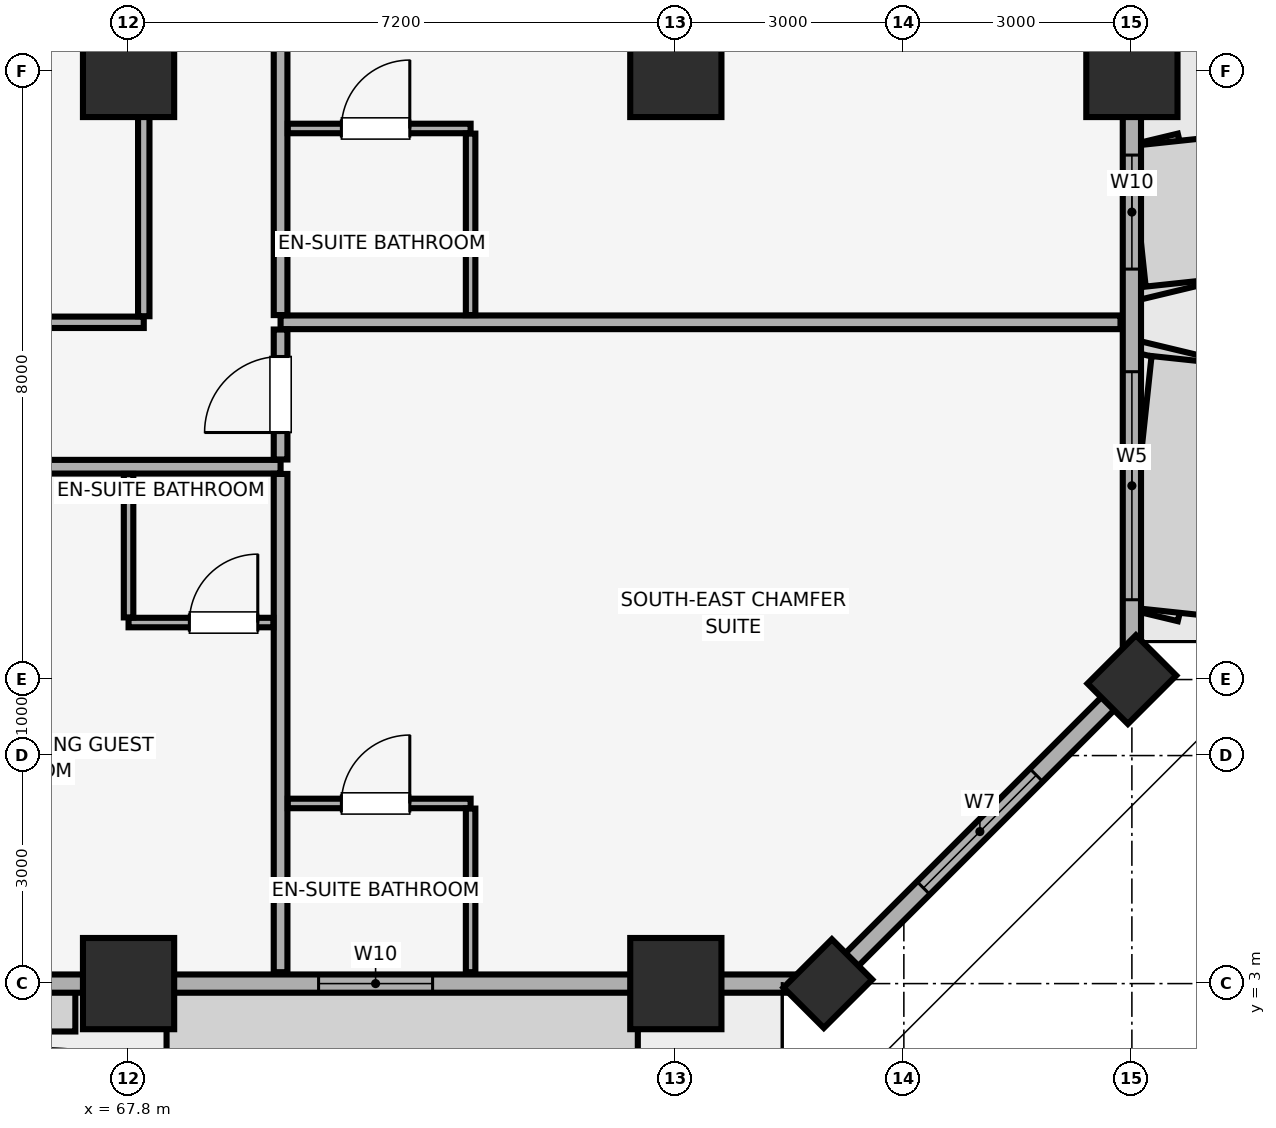
"""IFC4 building model, lengths in metres.
Left out: names, types, materials, properties, quantities, classifications, styles, units other than length and angle.
Written with IfcOpenShell. Run it as: python <this file> out.ifc"""

import sys

from ifc_helpers import new_model, si_unit, direction, frame, frame_2d, origin, origin_2d, place, context, subcontext, project, spatial, rectangle, extrude, element, fill, save


model = new_model("IFC4")
c1 = context("Model", 3, precision=1e-05, world=origin(), true_north=direction((0.0, 1.0)))
c2 = subcontext(c1, "Body", "Model", "MODEL_VIEW")
j1 = project(units=[si_unit("LENGTHUNIT", "METRE"), si_unit("PLANEANGLEUNIT", "RADIAN")], contexts=[c1])
p1 = place(None, origin())
s1 = spatial("IfcSite", under=j1, at=p1, CompositionType="ELEMENT")
p2 = place(p1, origin())
s2 = spatial("IfcBuilding", under=s1, at=p2, CompositionType="ELEMENT")
p3 = place(p2, frame((0.0, 0.0, 135.35)))
s3 = spatial("IfcBuildingStorey", under=s2, at=p3, CompositionType="ELEMENT", Elevation=135.35)
for number, where, z_axis, x_axis in (
    (1, (67.8, 3.0, 0.0), (0.0, 0.0, 1.0), (1.0, 0.0, 0.0)),
    (2, (75.0, 3.0, 0.0), (0.0, 0.0, 1.0), (1.0, 0.0, 0.0)),
    (3, (81.0, 15.0, 0.0), (0.0, 0.0, 1.0), (1.0, 0.0, 0.0)),
):
    element("IfcColumn", number, at=place(p3, frame(where, z_axis=z_axis, x_axis=x_axis)), inside=s3, PredefinedType="COLUMN", context=c2, shape_type="SweptSolid", body=[
        extrude(rectangle(XDim=1.2, YDim=1.2, at=origin_2d()), origin(), (0.0, 0.0, 1.0), 3.56),
    ])
for number, where, z_axis, x_axis in (
    (4, (77.0, 3.0, 0.0), (0.0, 0.0, 1.0), (0.707, 0.707, 0.0)),
    (5, (81.0, 7.0, 0.0), (0.0, 0.0, 1.0), (0.707, 0.707, 0.0)),
):
    element("IfcColumn", number, at=place(p3, frame(where, z_axis=z_axis, x_axis=x_axis)), inside=s3, PredefinedType="PILASTER", context=c2, shape_type="SweptSolid", body=[
        extrude(rectangle(XDim=0.9, YDim=0.75, at=origin_2d()), origin(), (0.0, 0.0, 1.0), 3.56),
    ])
for number, where, z_axis, x_axis in (
    (6, (67.8, 15.0, 0.0), (0.0, 0.0, 1.0), (1.0, 0.0, 0.0)),
    (7, (75.0, 15.0, 0.0), (0.0, 0.0, 1.0), (1.0, 0.0, 0.0)),
):
    element("IfcColumn", number, at=place(p3, frame(where, z_axis=z_axis, x_axis=x_axis)), inside=s3, PredefinedType="COLUMN", context=c2, shape_type="SweptSolid", body=[
        extrude(rectangle(XDim=1.2, YDim=1.2, at=origin_2d()), origin(), (0.0, 0.0, 1.0), 3.56),
    ])
p4 = place(p3, frame((7.0, 3.0, 0.0), z_axis=(0.0, 0.0, 1.0), x_axis=(1.0, 0.0, 0.0)))
e8 = element("IfcWall", 8, at=p4, inside=s3, PredefinedType="SOLIDWALL", context=c2, shape_type="SweptSolid", body=[
    extrude(rectangle(XDim=70.0, YDim=0.24, at=frame_2d((35.0, 0.0))), origin(), (0.0, 0.0, 1.0), 2.61),
])
p5 = place(p4, frame((19.517, 0.0, 0.0)))
e9 = element("IfcOpeningElement", 9, at=p5, cuts=e8, PredefinedType="OPENING", context=c2, shape_type="SweptSolid", body=[
    extrude(rectangle(XDim=1.1, YDim=2.15, at=frame_2d((0.55, 1.075))), frame((0.0, 0.13, 0.0), z_axis=(0.0, -1.0, 0.0), x_axis=(1.0, 0.0, 0.0)), (0.0, 0.0, 1.0), 0.26),
])
p6 = place(p4, frame((34.45, 0.0, 0.0)))
e10 = element("IfcOpeningElement", 10, at=p6, cuts=e8, PredefinedType="OPENING", context=c2, shape_type="SweptSolid", body=[
    extrude(rectangle(XDim=1.1, YDim=2.15, at=frame_2d((0.55, 1.075))), frame((0.0, 0.13, 0.0), z_axis=(0.0, -1.0, 0.0), x_axis=(1.0, 0.0, 0.0)), (0.0, 0.0, 1.0), 0.26),
])
p7 = place(p4, frame((49.421, 0.0, 0.0)))
e11 = element("IfcOpeningElement", 11, at=p7, cuts=e8, PredefinedType="OPENING", context=c2, shape_type="SweptSolid", body=[
    extrude(rectangle(XDim=1.1, YDim=2.15, at=frame_2d((0.55, 1.075))), frame((0.0, 0.13, 0.0), z_axis=(0.0, -1.0, 0.0), x_axis=(1.0, 0.0, 0.0)), (0.0, 0.0, 1.0), 0.26),
])
p8 = place(p4, frame((5.2, 0.0, 0.85)))
e12 = element("IfcOpeningElement", 12, at=p8, cuts=e8, PredefinedType="OPENING", context=c2, shape_type="SweptSolid", body=[
    extrude(rectangle(XDim=1.5, YDim=1.4, at=frame_2d((0.75, 0.7))), frame((0.0, 0.13, 0.0), z_axis=(0.0, -1.0, 0.0), x_axis=(1.0, 0.0, 0.0)), (0.0, 0.0, 1.0), 0.26),
])
p9 = place(p4, frame((10.163, 0.0, 0.85)))
e13 = element("IfcOpeningElement", 13, at=p9, cuts=e8, PredefinedType="OPENING", context=c2, shape_type="SweptSolid", body=[
    extrude(rectangle(XDim=1.5, YDim=1.4, at=frame_2d((0.75, 0.7))), frame((0.0, 0.13, 0.0), z_axis=(0.0, -1.0, 0.0), x_axis=(1.0, 0.0, 0.0)), (0.0, 0.0, 1.0), 0.26),
])
p10 = place(p4, frame((12.913, 0.0, 0.85)))
e14 = element("IfcOpeningElement", 14, at=p10, cuts=e8, PredefinedType="OPENING", context=c2, shape_type="SweptSolid", body=[
    extrude(rectangle(XDim=2.4, YDim=1.5, at=frame_2d((1.2, 0.75))), frame((0.0, 0.13, 0.0), z_axis=(0.0, -1.0, 0.0), x_axis=(1.0, 0.0, 0.0)), (0.0, 0.0, 1.0), 0.26),
])
p11 = place(p4, frame((24.45, 0.0, 0.85)))
e15 = element("IfcOpeningElement", 15, at=p11, cuts=e8, PredefinedType="OPENING", context=c2, shape_type="SweptSolid", body=[
    extrude(rectangle(XDim=2.4, YDim=1.5, at=frame_2d((1.2, 0.75))), frame((0.0, 0.13, 0.0), z_axis=(0.0, -1.0, 0.0), x_axis=(1.0, 0.0, 0.0)), (0.0, 0.0, 1.0), 0.26),
])
p12 = place(p4, frame((28.101, 0.0, 0.85)))
e16 = element("IfcOpeningElement", 16, at=p12, cuts=e8, PredefinedType="OPENING", context=c2, shape_type="SweptSolid", body=[
    extrude(rectangle(XDim=1.5, YDim=1.4, at=frame_2d((0.75, 0.7))), frame((0.0, 0.13, 0.0), z_axis=(0.0, -1.0, 0.0), x_axis=(1.0, 0.0, 0.0)), (0.0, 0.0, 1.0), 0.26),
])
p13 = place(p4, frame((40.239, 0.0, 0.85)))
e17 = element("IfcOpeningElement", 17, at=p13, cuts=e8, PredefinedType="OPENING", context=c2, shape_type="SweptSolid", body=[
    extrude(rectangle(XDim=1.5, YDim=1.4, at=frame_2d((0.75, 0.7))), frame((0.0, 0.13, 0.0), z_axis=(0.0, -1.0, 0.0), x_axis=(1.0, 0.0, 0.0)), (0.0, 0.0, 1.0), 0.26),
])
p14 = place(p4, frame((42.989, 0.0, 0.85)))
e18 = element("IfcOpeningElement", 18, at=p14, cuts=e8, PredefinedType="OPENING", context=c2, shape_type="SweptSolid", body=[
    extrude(rectangle(XDim=2.4, YDim=1.5, at=frame_2d((1.2, 0.75))), frame((0.0, 0.13, 0.0), z_axis=(0.0, -1.0, 0.0), x_axis=(1.0, 0.0, 0.0)), (0.0, 0.0, 1.0), 0.26),
])
p15 = place(p4, frame((54.581, 0.0, 0.85)))
e19 = element("IfcOpeningElement", 19, at=p15, cuts=e8, PredefinedType="OPENING", context=c2, shape_type="SweptSolid", body=[
    extrude(rectangle(XDim=2.4, YDim=1.5, at=frame_2d((1.2, 0.75))), frame((0.0, 0.13, 0.0), z_axis=(0.0, -1.0, 0.0), x_axis=(1.0, 0.0, 0.0)), (0.0, 0.0, 1.0), 0.26),
])
p16 = place(p4, frame((58.23, 0.0, 0.85)))
e20 = element("IfcOpeningElement", 20, at=p16, cuts=e8, PredefinedType="OPENING", context=c2, shape_type="SweptSolid", body=[
    extrude(rectangle(XDim=1.5, YDim=1.4, at=frame_2d((0.75, 0.7))), frame((0.0, 0.13, 0.0), z_axis=(0.0, -1.0, 0.0), x_axis=(1.0, 0.0, 0.0)), (0.0, 0.0, 1.0), 0.26),
])
p17 = place(p4, frame((63.3, 0.0, 0.85)))
e21 = element("IfcOpeningElement", 21, at=p17, cuts=e8, PredefinedType="OPENING", context=c2, shape_type="SweptSolid", body=[
    extrude(rectangle(XDim=1.5, YDim=1.4, at=frame_2d((0.75, 0.7))), frame((0.0, 0.13, 0.0), z_axis=(0.0, -1.0, 0.0), x_axis=(1.0, 0.0, 0.0)), (0.0, 0.0, 1.0), 0.26),
])
p18 = place(p3, frame((77.0, 3.0, 0.0), z_axis=(0.0, 0.0, 1.0), x_axis=(0.707106781187, 0.707106781187, 0.0)))
e22 = element("IfcWall", 22, at=p18, inside=s3, PredefinedType="SOLIDWALL", context=c2, shape_type="SweptSolid", body=[
    extrude(rectangle(XDim=5.657, YDim=0.24, at=frame_2d((2.828, 0.0))), origin(), (0.0, 0.0, 1.0), 2.61),
])
p19 = place(p18, frame((1.778, 0.0, 0.85)))
e23 = element("IfcOpeningElement", 23, at=p19, cuts=e22, PredefinedType="OPENING", context=c2, shape_type="SweptSolid", body=[
    extrude(rectangle(XDim=2.1, YDim=1.6, at=frame_2d((1.05, 0.8))), frame((0.0, 0.13, 0.0), z_axis=(0.0, -1.0, 0.0), x_axis=(1.0, 0.0, 0.0)), (0.0, 0.0, 1.0), 0.26),
])
p20 = place(p3, frame((81.0, 7.0, 0.0), z_axis=(0.0, 0.0, 1.0), x_axis=(0.0, 1.0, 0.0)))
e24 = element("IfcWall", 24, at=p20, inside=s3, PredefinedType="SOLIDWALL", context=c2, shape_type="SweptSolid", body=[
    extrude(rectangle(XDim=38.0, YDim=0.24, at=frame_2d((19.0, 0.0))), origin(), (0.0, 0.0, 1.0), 2.61),
])
p21 = place(p20, frame((14.5, 0.0, 0.0)))
e25 = element("IfcOpeningElement", 25, at=p21, cuts=e24, PredefinedType="OPENING", context=c2, shape_type="SweptSolid", body=[
    extrude(rectangle(XDim=1.4, YDim=2.2, at=frame_2d((0.7, 1.1))), frame((0.0, 0.13, 0.0), z_axis=(0.0, -1.0, 0.0), x_axis=(1.0, 0.0, 0.0)), (0.0, 0.0, 1.0), 0.26),
])
p22 = place(p20, frame((1.05, 0.0, 0.85)))
e26 = element("IfcOpeningElement", 26, at=p22, cuts=e24, PredefinedType="OPENING", context=c2, shape_type="SweptSolid", body=[
    extrude(rectangle(XDim=3.0, YDim=1.5, at=frame_2d((1.5, 0.75))), frame((0.0, 0.13, 0.0), z_axis=(0.0, -1.0, 0.0), x_axis=(1.0, 0.0, 0.0)), (0.0, 0.0, 1.0), 0.26),
])
p23 = place(p20, frame((5.4, 0.0, 0.85)))
e27 = element("IfcOpeningElement", 27, at=p23, cuts=e24, PredefinedType="OPENING", context=c2, shape_type="SweptSolid", body=[
    extrude(rectangle(XDim=1.5, YDim=1.4, at=frame_2d((0.75, 0.7))), frame((0.0, 0.13, 0.0), z_axis=(0.0, -1.0, 0.0), x_axis=(1.0, 0.0, 0.0)), (0.0, 0.0, 1.0), 0.26),
])
p24 = place(p20, frame((9.84, 0.0, 0.85)))
e28 = element("IfcOpeningElement", 28, at=p24, cuts=e24, PredefinedType="OPENING", context=c2, shape_type="SweptSolid", body=[
    extrude(rectangle(XDim=3.0, YDim=1.5, at=frame_2d((1.5, 0.75))), frame((0.0, 0.13, 0.0), z_axis=(0.0, -1.0, 0.0), x_axis=(1.0, 0.0, 0.0)), (0.0, 0.0, 1.0), 0.26),
])
p25 = place(p20, frame((17.56, 0.0, 0.85)))
e29 = element("IfcOpeningElement", 29, at=p25, cuts=e24, PredefinedType="OPENING", context=c2, shape_type="SweptSolid", body=[
    extrude(rectangle(XDim=3.0, YDim=1.5, at=frame_2d((1.5, 0.75))), frame((0.0, 0.13, 0.0), z_axis=(0.0, -1.0, 0.0), x_axis=(1.0, 0.0, 0.0)), (0.0, 0.0, 1.0), 0.26),
])
p26 = place(p20, frame((23.615, 0.0, 0.85)))
e30 = element("IfcOpeningElement", 30, at=p26, cuts=e24, PredefinedType="OPENING", context=c2, shape_type="SweptSolid", body=[
    extrude(rectangle(XDim=3.0, YDim=1.5, at=frame_2d((1.5, 0.75))), frame((0.0, 0.13, 0.0), z_axis=(0.0, -1.0, 0.0), x_axis=(1.0, 0.0, 0.0)), (0.0, 0.0, 1.0), 0.26),
])
p27 = place(p20, frame((28.385, 0.0, 0.85)))
e31 = element("IfcOpeningElement", 31, at=p27, cuts=e24, PredefinedType="OPENING", context=c2, shape_type="SweptSolid", body=[
    extrude(rectangle(XDim=3.0, YDim=1.5, at=frame_2d((1.5, 0.75))), frame((0.0, 0.13, 0.0), z_axis=(0.0, -1.0, 0.0), x_axis=(1.0, 0.0, 0.0)), (0.0, 0.0, 1.0), 0.26),
])
p28 = place(p20, frame((33.915, 0.0, 0.85)))
e32 = element("IfcOpeningElement", 32, at=p28, cuts=e24, PredefinedType="OPENING", context=c2, shape_type="SweptSolid", body=[
    extrude(rectangle(XDim=3.0, YDim=1.5, at=frame_2d((1.5, 0.75))), frame((0.0, 0.13, 0.0), z_axis=(0.0, -1.0, 0.0), x_axis=(1.0, 0.0, 0.0)), (0.0, 0.0, 1.0), 0.26),
])
p29 = place(p3, frame((64.656, 9.8, 0.0), z_axis=(0.0, 0.0, 1.0), x_axis=(1.0, 0.0, 0.0)))
e33 = element("IfcWall", 33, at=p29, inside=s3, PredefinedType="PARTITIONING", context=c2, shape_type="SweptSolid", body=[
    extrude(rectangle(XDim=5.144, YDim=0.18, at=frame_2d((2.572, 0.0))), origin(), (0.0, 0.0, 1.0), 3.56),
])
p30 = place(p29, frame((0.65, 0.0, 0.0)))
e34 = element("IfcOpeningElement", 34, at=p30, cuts=e33, PredefinedType="OPENING", context=c2, shape_type="SweptSolid", body=[
    extrude(rectangle(XDim=1.0, YDim=2.15, at=frame_2d((0.5, 1.075))), frame((0.0, 0.1, 0.0), z_axis=(0.0, -1.0, 0.0), x_axis=(1.0, 0.0, 0.0)), (0.0, 0.0, 1.0), 0.2),
])
p31 = place(p3, frame((69.8, 3.15, 0.0), z_axis=(0.0, 0.0, 1.0), x_axis=(0.0, 1.0, 0.0)))
e35 = element("IfcWall", 35, at=p31, inside=s3, PredefinedType="PARTITIONING", context=c2, shape_type="SweptSolid", body=[
    extrude(rectangle(XDim=6.555, YDim=0.18, at=frame_2d((3.278, 0.0))), origin(), (0.0, 0.0, 1.0), 3.56),
])
p32 = place(p3, frame((67.8, 7.75, 0.0), z_axis=(0.0, 0.0, 1.0), x_axis=(1.0, 0.0, 0.0)))
e36 = element("IfcWall", 36, at=p32, inside=s3, PredefinedType="PARTITIONING", context=c2, shape_type="SweptSolid", body=[
    extrude(rectangle(XDim=1.905, YDim=0.125, at=frame_2d((0.953, 0.0))), origin(), (0.0, 0.0, 1.0), 3.56),
])
p33 = place(p32, frame((0.8, 0.0, 0.0)))
e37 = element("IfcOpeningElement", 37, at=p33, cuts=e36, PredefinedType="OPENING", context=c2, shape_type="SweptSolid", body=[
    extrude(rectangle(XDim=0.9, YDim=2.1, at=frame_2d((0.45, 1.05))), frame((0.0, 0.073, 0.0), z_axis=(0.0, -1.0, 0.0), x_axis=(1.0, 0.0, 0.0)), (0.0, 0.0, 1.0), 0.145),
])
p34 = place(p3, frame((67.8, 7.817, 0.0), z_axis=(0.0, 0.0, 1.0), x_axis=(0.0, 1.0, 0.0)))
e38 = element("IfcWall", 38, at=p34, inside=s3, PredefinedType="PARTITIONING", context=c2, shape_type="SweptSolid", body=[
    extrude(rectangle(XDim=1.888, YDim=0.125, at=frame_2d((0.944, 0.0))), origin(), (0.0, 0.0, 1.0), 3.01),
])
p35 = place(p3, frame((69.8, 11.7, 0.0), z_axis=(0.0, 0.0, 1.0), x_axis=(1.0, 0.0, 0.0)))
e39 = element("IfcWall", 39, at=p35, inside=s3, PredefinedType="PARTITIONING", context=c2, shape_type="SweptSolid", body=[
    extrude(rectangle(XDim=11.05, YDim=0.18, at=frame_2d((5.525, 0.0))), origin(), (0.0, 0.0, 1.0), 3.56),
])
p36 = place(p3, frame((69.8, 9.895, 0.0), z_axis=(0.0, 0.0, 1.0), x_axis=(0.0, 1.0, 0.0)))
e40 = element("IfcWall", 40, at=p36, inside=s3, PredefinedType="PARTITIONING", context=c2, shape_type="SweptSolid", body=[
    extrude(rectangle(XDim=1.71, YDim=0.18, at=frame_2d((0.855, 0.0))), origin(), (0.0, 0.0, 1.0), 3.56),
])
p37 = place(p36, frame((0.355, 0.0, 0.0)))
e41 = element("IfcOpeningElement", 41, at=p37, cuts=e40, PredefinedType="OPENING", context=c2, shape_type="SweptSolid", body=[
    extrude(rectangle(XDim=1.0, YDim=2.15, at=frame_2d((0.5, 1.075))), frame((0.0, 0.1, 0.0), z_axis=(0.0, -1.0, 0.0), x_axis=(1.0, 0.0, 0.0)), (0.0, 0.0, 1.0), 0.2),
])
p38 = place(p3, frame((69.895, 5.37, 0.0), z_axis=(0.0, 0.0, 1.0), x_axis=(1.0, 0.0, 0.0)))
e42 = element("IfcWall", 42, at=p38, inside=s3, PredefinedType="PARTITIONING", context=c2, shape_type="SweptSolid", body=[
    extrude(rectangle(XDim=2.405, YDim=0.125, at=frame_2d((1.203, 0.0))), origin(), (0.0, 0.0, 1.0), 3.56),
])
p39 = place(p38, frame((0.705, 0.0, 0.0)))
e43 = element("IfcOpeningElement", 43, at=p39, cuts=e42, PredefinedType="OPENING", context=c2, shape_type="SweptSolid", body=[
    extrude(rectangle(XDim=0.9, YDim=2.1, at=frame_2d((0.45, 1.05))), frame((0.0, 0.073, 0.0), z_axis=(0.0, -1.0, 0.0), x_axis=(1.0, 0.0, 0.0)), (0.0, 0.0, 1.0), 0.145),
])
p40 = place(p3, frame((72.3, 3.15, 0.0), z_axis=(0.0, 0.0, 1.0), x_axis=(0.0, 1.0, 0.0)))
e44 = element("IfcWall", 44, at=p40, inside=s3, PredefinedType="PARTITIONING", context=c2, shape_type="SweptSolid", body=[
    extrude(rectangle(XDim=2.153, YDim=0.125, at=frame_2d((1.076, 0.0))), origin(), (0.0, 0.0, 1.0), 3.56),
])
p41 = place(p3, frame((69.8, 11.795, 0.0), z_axis=(0.0, 0.0, 1.0), x_axis=(0.0, 1.0, 0.0)))
e45 = element("IfcWall", 45, at=p41, inside=s3, PredefinedType="PARTITIONING", context=c2, shape_type="SweptSolid", body=[
    extrude(rectangle(XDim=17.51, YDim=0.18, at=frame_2d((8.755, 0.0))), origin(), (0.0, 0.0, 1.0), 3.56),
])
p42 = place(p41, frame((9.905, 0.0, 0.0)))
e46 = element("IfcOpeningElement", 46, at=p42, cuts=e45, PredefinedType="OPENING", context=c2, shape_type="SweptSolid", body=[
    extrude(rectangle(XDim=1.0, YDim=2.15, at=frame_2d((0.5, 1.075))), frame((0.0, 0.1, 0.0), z_axis=(0.0, -1.0, 0.0), x_axis=(1.0, 0.0, 0.0)), (0.0, 0.0, 1.0), 0.2),
])
p43 = place(p3, frame((69.895, 14.25, 0.0), z_axis=(0.0, 0.0, 1.0), x_axis=(1.0, 0.0, 0.0)))
e47 = element("IfcWall", 47, at=p43, inside=s3, PredefinedType="PARTITIONING", context=c2, shape_type="SweptSolid", body=[
    extrude(rectangle(XDim=2.405, YDim=0.125, at=frame_2d((1.203, 0.0))), origin(), (0.0, 0.0, 1.0), 3.56),
])
p44 = place(p43, frame((0.705, 0.0, 0.0)))
e48 = element("IfcOpeningElement", 48, at=p44, cuts=e47, PredefinedType="OPENING", context=c2, shape_type="SweptSolid", body=[
    extrude(rectangle(XDim=0.9, YDim=2.1, at=frame_2d((0.45, 1.05))), frame((0.0, 0.073, 0.0), z_axis=(0.0, -1.0, 0.0), x_axis=(1.0, 0.0, 0.0)), (0.0, 0.0, 1.0), 0.145),
])
p45 = place(p3, frame((72.3, 11.795, 0.0), z_axis=(0.0, 0.0, 1.0), x_axis=(0.0, 1.0, 0.0)))
e49 = element("IfcWall", 49, at=p45, inside=s3, PredefinedType="PARTITIONING", context=c2, shape_type="SweptSolid", body=[
    extrude(rectangle(XDim=2.388, YDim=0.125, at=frame_2d((1.194, 0.0))), origin(), (0.0, 0.0, 1.0), 3.56),
])
p46 = place(p3, frame((59.0, 11.7, 0.0), z_axis=(0.0, 0.0, 1.0), x_axis=(1.0, 0.0, 0.0)))
e50 = element("IfcWall", 50, at=p46, inside=s3, PredefinedType="PARTITIONING", context=c2, shape_type="SweptSolid", body=[
    extrude(rectangle(XDim=9.0, YDim=0.15, at=frame_2d((4.5, 0.0))), origin(), (0.0, 0.0, 1.0), 3.56),
])
p47 = place(p3, frame((68.0, 11.78, 0.0), z_axis=(0.0, 0.0, 1.0), x_axis=(0.0, 1.0, 0.0)))
e51 = element("IfcWall", 51, at=p47, inside=s3, PredefinedType="PARTITIONING", context=c2, shape_type="SweptSolid", body=[
    extrude(rectangle(XDim=15.34, YDim=0.15, at=frame_2d((7.67, 0.0))), origin(), (0.0, 0.0, 1.0), 3.01),
])
p48 = place(p19, origin())
e52 = element("IfcWindow", 52, at=p48, inside=s3, PartitioningType="SINGLE_PANEL", PredefinedType="WINDOW", context=c2, shape_type="SweptSolid", body=[
    extrude(rectangle(XDim=2.1, YDim=1.6, at=frame_2d((1.05, 0.8))), frame((0.0, 0.03, 0.0), z_axis=(0.0, -1.0, 0.0), x_axis=(1.0, 0.0, 0.0)), (0.0, 0.0, 1.0), 0.06),
])
fill(e23, e52)
p49 = place(p17, origin())
e53 = element("IfcWindow", 53, at=p49, inside=s3, PartitioningType="SINGLE_PANEL", PredefinedType="WINDOW", context=c2, shape_type="SweptSolid", body=[
    extrude(rectangle(XDim=1.5, YDim=1.4, at=frame_2d((0.75, 0.7))), frame((0.0, 0.03, 0.0), z_axis=(0.0, -1.0, 0.0), x_axis=(1.0, 0.0, 0.0)), (0.0, 0.0, 1.0), 0.06),
])
fill(e21, e53)
p50 = place(p22, origin())
e54 = element("IfcWindow", 54, at=p50, inside=s3, PartitioningType="SINGLE_PANEL", PredefinedType="WINDOW", context=c2, shape_type="SweptSolid", body=[
    extrude(rectangle(XDim=3.0, YDim=1.5, at=frame_2d((1.5, 0.75))), frame((0.0, 0.03, 0.0), z_axis=(0.0, -1.0, 0.0), x_axis=(1.0, 0.0, 0.0)), (0.0, 0.0, 1.0), 0.06),
])
fill(e26, e54)
p51 = place(p23, origin())
e55 = element("IfcWindow", 55, at=p51, inside=s3, PartitioningType="SINGLE_PANEL", PredefinedType="WINDOW", context=c2, shape_type="SweptSolid", body=[
    extrude(rectangle(XDim=1.5, YDim=1.4, at=frame_2d((0.75, 0.7))), frame((0.0, 0.03, 0.0), z_axis=(0.0, -1.0, 0.0), x_axis=(1.0, 0.0, 0.0)), (0.0, 0.0, 1.0), 0.06),
])
fill(e27, e55)
p52 = place(p33, origin())
e56 = element("IfcDoor", 56, at=p52, inside=s3, OperationType="SINGLE_SWING_RIGHT", PredefinedType="DOOR", context=c2, shape_type="SweptSolid", body=[
    extrude(rectangle(XDim=0.9, YDim=2.1, at=frame_2d((0.45, 1.05))), frame((0.0, 0.025, 0.0), z_axis=(0.0, -1.0, 0.0), x_axis=(1.0, 0.0, 0.0)), (0.0, 0.0, 1.0), 0.05),
])
fill(e37, e56)
p53 = place(p37, origin())
e57 = element("IfcDoor", 57, at=p53, inside=s3, OperationType="SINGLE_SWING_LEFT", PredefinedType="DOOR", context=c2, shape_type="SweptSolid", body=[
    extrude(rectangle(XDim=1.0, YDim=2.15, at=frame_2d((0.5, 1.075))), frame((0.0, 0.025, 0.0), z_axis=(0.0, -1.0, 0.0), x_axis=(1.0, 0.0, 0.0)), (0.0, 0.0, 1.0), 0.05),
])
fill(e41, e57)
p54 = place(p39, origin())
e58 = element("IfcDoor", 58, at=p54, inside=s3, OperationType="SINGLE_SWING_RIGHT", PredefinedType="DOOR", context=c2, shape_type="SweptSolid", body=[
    extrude(rectangle(XDim=0.9, YDim=2.1, at=frame_2d((0.45, 1.05))), frame((0.0, 0.025, 0.0), z_axis=(0.0, -1.0, 0.0), x_axis=(1.0, 0.0, 0.0)), (0.0, 0.0, 1.0), 0.05),
])
fill(e43, e58)
p55 = place(p44, origin())
e59 = element("IfcDoor", 59, at=p55, inside=s3, OperationType="SINGLE_SWING_RIGHT", PredefinedType="DOOR", context=c2, shape_type="SweptSolid", body=[
    extrude(rectangle(XDim=0.9, YDim=2.1, at=frame_2d((0.45, 1.05))), frame((0.0, 0.025, 0.0), z_axis=(0.0, -1.0, 0.0), x_axis=(1.0, 0.0, 0.0)), (0.0, 0.0, 1.0), 0.05),
])
fill(e48, e59)
save(model, sys.argv[1])
